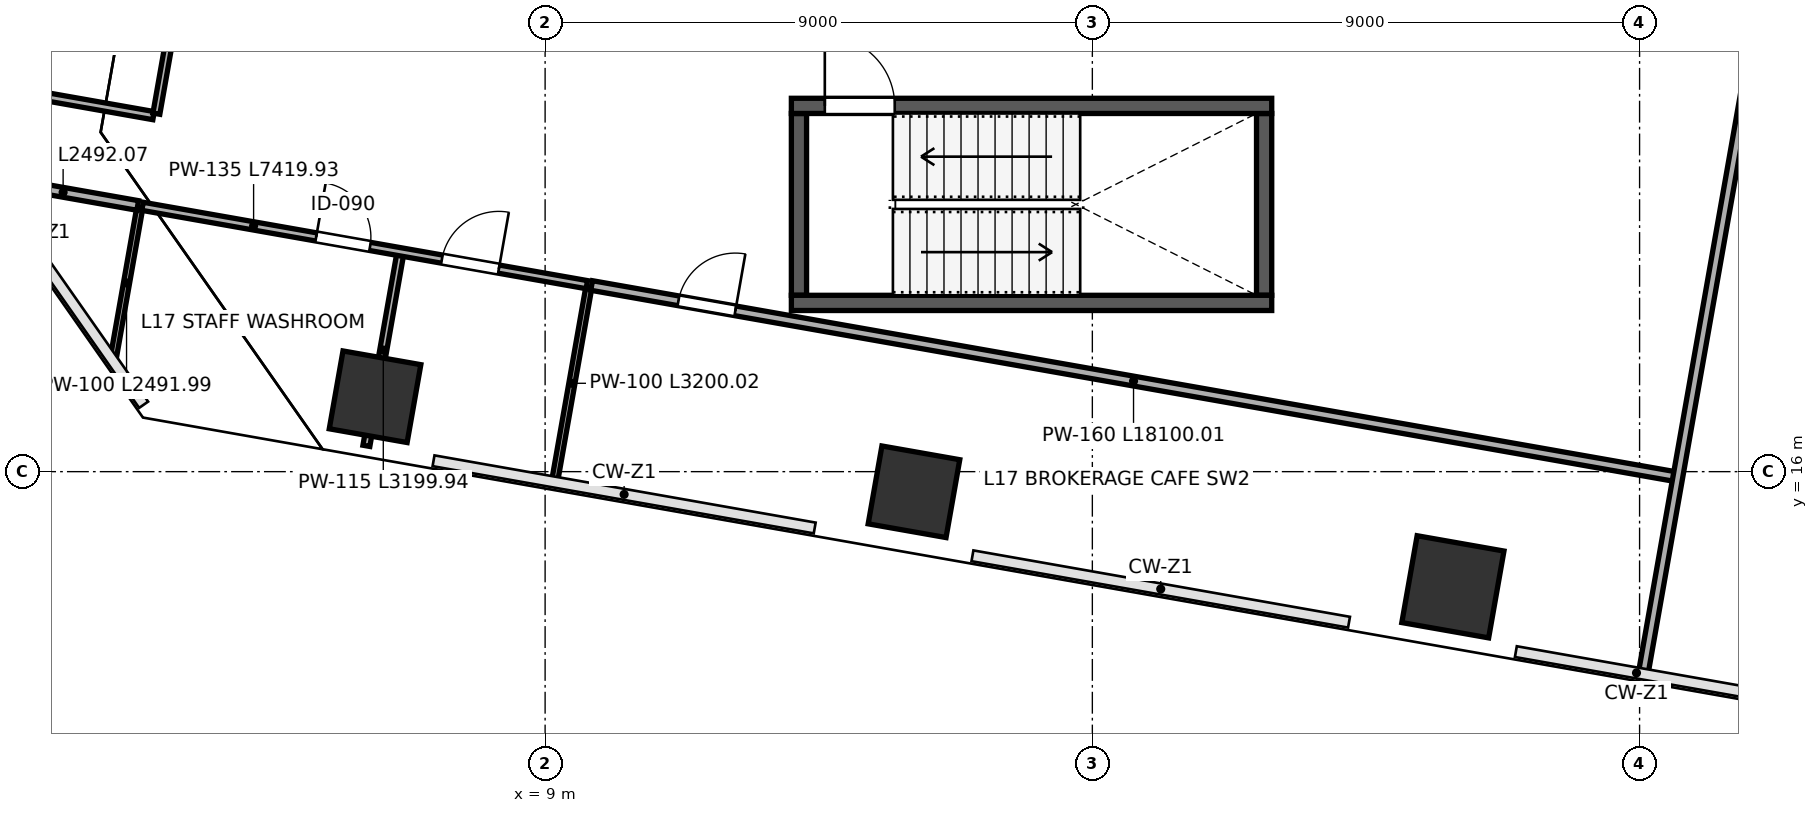
"""IFC4 building model, lengths in metres.
Left out: names, types, materials, properties, quantities, classifications, styles, units other than length and angle.
Written with IfcOpenShell. Run it as: python <this file> out.ifc"""

import sys

from ifc_helpers import new_model, si_unit, direction, frame, frame_2d, origin, origin_2d, place, context, subcontext, project, spatial, rectangle, extrude, clip, halfspace, source, transform, mapped, element, fill, save


model = new_model("IFC4")
c1 = context("Model", 3, precision=1e-05, world=origin(), true_north=direction((0.0, 1.0)))
c2 = subcontext(c1, "Body", "Model", "MODEL_VIEW")
j1 = project(units=[si_unit("LENGTHUNIT", "METRE"), si_unit("PLANEANGLEUNIT", "RADIAN")], contexts=[c1])
p1 = place(None, origin())
s1 = spatial("IfcSite", under=j1, at=p1, CompositionType="ELEMENT")
p2 = place(p1, origin())
s2 = spatial("IfcBuilding", under=s1, at=p2, CompositionType="ELEMENT")
p3 = place(p2, frame((0.0, 0.0, 79.0)))
s3 = spatial("IfcBuildingStorey", under=s2, at=p3, CompositionType="ELEMENT", Elevation=79.0)
p4 = place(p3, frame((6.203, 17.232, 0.0), z_axis=(-0.075400354658, 0.079791486424, 0.993955786347), x_axis=(0.834326240364, 0.550941299546, 0.01906329181)))
e1 = element("IfcColumn", 1, at=p4, inside=s3, PredefinedType="COLUMN", context=c2, shape_type="Clipping", body=[
    clip(clip(extrude(rectangle(XDim=1.3, YDim=1.3, at=origin_2d()), origin(), (0.0, 0.0, 1.0), 4.226), halfspace(frame((0.0, 0.0, 0.084), z_axis=(0.0, 0.0, -1.0), x_axis=(1.0, 0.0, 0.0)), False)), halfspace(frame((0.0, 0.0, 4.142), z_axis=(0.0, 0.0, 1.0), x_axis=(1.0, 0.0, 0.0)), False)),
])
p5 = place(p3, frame((15.066, 15.669, 0.0), z_axis=(-0.084113242022, 0.034154723189, 0.995870683071), x_axis=(0.530733153441, 0.847392356417, 0.015764330737)))
e2 = element("IfcColumn", 2, at=p5, inside=s3, PredefinedType="COLUMN", context=c2, shape_type="Clipping", body=[
    clip(clip(extrude(rectangle(XDim=1.3, YDim=1.3, at=origin_2d()), origin(), (0.0, 0.0, 1.0), 4.217), halfspace(frame((0.0, 0.0, 0.069), z_axis=(0.0, 0.0, -1.0), x_axis=(1.0, 0.0, 0.0)), False)), halfspace(frame((0.0, 0.0, 4.148), z_axis=(0.0, 0.0, 1.0), x_axis=(1.0, 0.0, 0.0)), False)),
])
p6 = place(p3, frame((23.93, 14.106, 0.0), z_axis=(-0.092658591781, -0.011517214094, 0.995631326922), x_axis=(0.050095109852, 0.998612834004, 0.016213812988)))
e3 = element("IfcColumn", 3, at=p6, inside=s3, PredefinedType="COLUMN", context=c2, shape_type="Clipping", body=[
    clip(clip(extrude(rectangle(XDim=1.45, YDim=1.45, at=origin_2d()), origin(), (0.0, 0.0, 1.0), 4.218), halfspace(frame((0.0, 0.0, 0.08), z_axis=(0.0, 0.0, -1.0), x_axis=(1.0, 0.0, 0.0)), False)), halfspace(frame((0.0, 0.0, 4.139), z_axis=(0.0, 0.0, 1.0), x_axis=(1.0, 0.0, 0.0)), False)),
])
for number, where, z_axis, x_axis in (
    (4, (13.175, 18.9, 0.0), (0.0, 0.0, 1.0), (0.0, 1.0, 0.0)),
    (5, (20.825, 18.9, 0.0), (0.0, 0.0, 1.0), (0.0, 1.0, 0.0)),
):
    element("IfcWall", number, at=place(p3, frame(where, z_axis=z_axis, x_axis=x_axis)), inside=s3, PredefinedType="SHEAR", context=c2, shape_type="SweptSolid", body=[
        extrude(rectangle(XDim=2.99, YDim=0.25, at=frame_2d((1.495, 0.0))), origin(), (0.0, 0.0, 1.0), 3.96),
    ])
p7 = place(p3, frame((13.05, 18.775, 0.0), z_axis=(0.0, 0.0, 1.0), x_axis=(1.0, 0.0, 0.0)))
e6 = element("IfcWall", 6, at=p7, inside=s3, PredefinedType="SHEAR", context=c2, shape_type="SweptSolid", body=[
    extrude(rectangle(XDim=7.9, YDim=0.25, at=frame_2d((3.95, 0.0))), origin(), (0.0, 0.0, 1.0), 3.96),
])
p8 = place(p3, frame((13.05, 22.015, 0.0), z_axis=(0.0, 0.0, 1.0), x_axis=(1.0, 0.0, 0.0)))
e7 = element("IfcWall", 7, at=p8, inside=s3, PredefinedType="SHEAR", context=c2, shape_type="SweptSolid", body=[
    extrude(rectangle(XDim=7.9, YDim=0.25, at=frame_2d((3.95, 0.0))), origin(), (0.0, 0.0, 1.0), 3.96),
])
p9 = place(p8, frame((0.55, 0.0, 0.0)))
e8 = element("IfcOpeningElement", 8, at=p9, cuts=e7, PredefinedType="OPENING", context=c2, shape_type="SweptSolid", body=[
    extrude(rectangle(XDim=1.15, YDim=2.2, at=frame_2d((0.575, 1.1))), frame((0.0, 0.135, 0.0), z_axis=(0.0, -1.0, 0.0), x_axis=(1.0, 0.0, 0.0)), (0.0, 0.0, 1.0), 0.27),
])
p10 = place(p3, frame((1.9, 17.877, 0.0), z_axis=(0.0, 0.0, 1.0), x_axis=(0.173701499557, 0.984798349436, 0.0)))
e9 = element("IfcWall", 9, at=p10, inside=s3, PredefinedType="PARTITIONING", context=c2, shape_type="SweptSolid", body=[
    extrude(rectangle(XDim=2.492, YDim=0.1, at=frame_2d((1.246, 0.0))), origin(), (0.0, 0.0, 1.0), 3.96),
])
p11 = place(p3, frame((-0.154, 20.81, 0.0), z_axis=(0.0, 0.0, 1.0), x_axis=(0.984798349436, -0.173701499557, 0.0)))
e10 = element("IfcWall", 10, at=p11, inside=s3, PredefinedType="PARTITIONING", context=c2, shape_type="SweptSolid", body=[
    extrude(rectangle(XDim=2.492, YDim=0.16, at=frame_2d((1.246, 0.0))), origin(), (0.0, 0.0, 1.0), 3.96),
])
p12 = place(p3, frame((6.061, 16.424, 0.0), z_axis=(0.0, 0.0, 1.0), x_axis=(0.173646056486, 0.984808127031, 0.0)))
e11 = element("IfcWall", 11, at=p12, inside=s3, PredefinedType="PARTITIONING", context=c2, shape_type="SweptSolid", body=[
    extrude(rectangle(XDim=3.2, YDim=0.115, at=frame_2d((1.6, 0.0))), origin(), (0.0, 0.0, 1.0), 3.095),
])
p13 = place(p3, frame((9.163, 15.877, 0.0), z_axis=(0.0, 0.0, 1.0), x_axis=(0.173646056486, 0.984808127031, 0.0)))
e12 = element("IfcWall", 12, at=p13, inside=s3, PredefinedType="PARTITIONING", context=c2, shape_type="SweptSolid", body=[
    extrude(rectangle(XDim=3.2, YDim=0.1, at=frame_2d((1.6, 0.0))), origin(), (0.0, 0.0, 1.0), 3.095),
])
p14 = place(p3, frame((2.379, 20.364, 0.0), z_axis=(0.0, 0.0, 1.0), x_axis=(0.984810378022, -0.173633289837, 0.0)))
e13 = element("IfcWall", 13, at=p14, inside=s3, PredefinedType="PARTITIONING", context=c2, shape_type="SweptSolid", body=[
    extrude(rectangle(XDim=7.42, YDim=0.135, at=frame_2d((3.71, 0.0))), origin(), (0.0, 0.0, 1.0), 3.96),
])
p15 = place(p14, frame((2.9, 0.0, 0.0)))
e14 = element("IfcOpeningElement", 14, at=p15, cuts=e13, PredefinedType="OPENING", context=c2, shape_type="SweptSolid", body=[
    extrude(rectangle(XDim=0.9, YDim=2.15, at=frame_2d((0.45, 1.075))), frame((0.0, 0.078, 0.0), z_axis=(0.0, -1.0, 0.0), x_axis=(1.0, 0.0, 0.0)), (0.0, 0.0, 1.0), 0.155),
])
p16 = place(p14, frame((5.0, 0.0, 0.0)))
e15 = element("IfcOpeningElement", 15, at=p16, cuts=e13, PredefinedType="OPENING", context=c2, shape_type="SweptSolid", body=[
    extrude(rectangle(XDim=0.95, YDim=2.15, at=frame_2d((0.475, 1.075))), frame((0.0, 0.078, 0.0), z_axis=(0.0, -1.0, 0.0), x_axis=(1.0, 0.0, 0.0)), (0.0, 0.0, 1.0), 0.155),
])
p17 = place(p3, frame((9.765, 19.061, 0.0), z_axis=(0.0, 0.0, 1.0), x_axis=(0.984807312871, -0.173650673815, 0.0)))
e16 = element("IfcWall", 16, at=p17, inside=s3, PredefinedType="PARTITIONING", context=c2, shape_type="SweptSolid", body=[
    extrude(rectangle(XDim=18.1, YDim=0.16, at=frame_2d((9.05, 0.0))), origin(), (0.0, 0.0, 1.0), 3.96),
])
p18 = place(p17, frame((1.45, 0.0, 0.0)))
e17 = element("IfcOpeningElement", 17, at=p18, cuts=e16, PredefinedType="OPENING", context=c2, shape_type="SweptSolid", body=[
    extrude(rectangle(XDim=0.95, YDim=2.15, at=frame_2d((0.475, 1.075))), frame((0.0, 0.09, 0.0), z_axis=(0.0, -1.0, 0.0), x_axis=(1.0, 0.0, 0.0)), (0.0, 0.0, 1.0), 0.18),
])
p19 = place(p3, frame((-1.014, 22.485, 0.0), z_axis=(0.0, 0.0, 1.0), x_axis=(0.984795743306, -0.173716274326, 0.0)))
e18 = element("IfcWall", 18, at=p19, inside=s3, PredefinedType="PARTITIONING", context=c2, shape_type="SweptSolid", body=[
    extrude(rectangle(XDim=3.63, YDim=0.135, at=frame_2d((1.815, 0.0))), origin(), (0.0, 0.0, 1.0), 3.96),
])
p20 = place(p3, frame((2.607, 21.887, 0.0), z_axis=(0.0, 0.0, 1.0), x_axis=(0.173659666579, 0.984805727138, 0.0)))
e19 = element("IfcWall", 19, at=p20, inside=s3, PredefinedType="PARTITIONING", context=c2, shape_type="SweptSolid", body=[
    extrude(rectangle(XDim=24.05, YDim=0.115, at=frame_2d((12.025, 0.0))), origin(), (0.0, 0.0, 1.0), 2.795),
])
p21 = place(p20, frame((2.2, 0.0, 0.0)))
e20 = element("IfcOpeningElement", 20, at=p21, cuts=e19, PredefinedType="OPENING", context=c2, shape_type="SweptSolid", body=[
    extrude(rectangle(XDim=0.95, YDim=2.15, at=frame_2d((0.475, 1.075))), frame((0.0, 0.067, 0.0), z_axis=(0.0, -1.0, 0.0), x_axis=(1.0, 0.0, 0.0)), (0.0, 0.0, 1.0), 0.135),
])
p22 = place(p3, frame((27.067, 12.72, 0.0), z_axis=(0.0, 0.0, 1.0), x_axis=(0.173654514703, 0.984806635601, 0.0)))
e21 = element("IfcWall", 21, at=p22, inside=s3, PredefinedType="PARTITIONING", context=c2, shape_type="SweptSolid", body=[
    extrude(rectangle(XDim=21.08, YDim=0.16, at=frame_2d((10.54, 0.0))), origin(), (0.0, 0.0, 1.0), 3.96),
])
m1 = source(origin(), c2, "Body", "SweptSolid", [
    extrude(rectangle(XDim=1.15, YDim=2.2, at=frame_2d((0.575, 1.1))), frame((0.0, 0.025, 0.0), z_axis=(0.0, -1.0, 0.0), x_axis=(1.0, 0.0, 0.0)), (0.0, 0.0, 1.0), 0.05),
])
p23 = place(p9, origin())
e22 = element("IfcDoor", 22, at=p23, inside=s3, OperationType="SINGLE_SWING_LEFT", PredefinedType="DOOR", context=c2, shape_type="MappedRepresentation", body=[
    mapped(m1, transform((0.0, 0.0, 0.0), scale=1.0)),
])
fill(e8, e22)
m2 = source(origin(), c2, "Body", "SweptSolid", [
    extrude(rectangle(XDim=0.9, YDim=2.15, at=frame_2d((0.45, 1.075))), frame((0.0, 0.025, 0.0), z_axis=(0.0, -1.0, 0.0), x_axis=(1.0, 0.0, 0.0)), (0.0, 0.0, 1.0), 0.05),
])
p24 = place(p15, origin())
e23 = element("IfcDoor", 23, at=p24, inside=s3, OperationType="SINGLE_SWING_LEFT", PredefinedType="DOOR", context=c2, shape_type="MappedRepresentation", body=[
    mapped(m2, transform((0.0, 0.0, 0.0), scale=1.0)),
])
fill(e14, e23)
m3 = source(origin(), c2, "Body", "SweptSolid", [
    extrude(rectangle(XDim=0.95, YDim=2.15, at=frame_2d((0.475, 1.075))), frame((0.0, 0.025, 0.0), z_axis=(0.0, -1.0, 0.0), x_axis=(1.0, 0.0, 0.0)), (0.0, 0.0, 1.0), 0.05),
])
p25 = place(p16, origin())
e24 = element("IfcDoor", 24, at=p25, inside=s3, OperationType="SINGLE_SWING_RIGHT", PredefinedType="DOOR", context=c2, shape_type="MappedRepresentation", body=[
    mapped(m3, transform((0.0, 0.0, 0.0), scale=1.0)),
])
fill(e15, e24)
m4 = source(origin(), c2, "Body", "SweptSolid", [
    extrude(rectangle(XDim=0.95, YDim=2.15, at=frame_2d((0.475, 1.075))), frame((0.0, 0.025, 0.0), z_axis=(0.0, -1.0, 0.0), x_axis=(1.0, 0.0, 0.0)), (0.0, 0.0, 1.0), 0.05),
])
p26 = place(p18, origin())
e25 = element("IfcDoor", 25, at=p26, inside=s3, OperationType="SINGLE_SWING_RIGHT", PredefinedType="DOOR", context=c2, shape_type="MappedRepresentation", body=[
    mapped(m4, transform((0.0, 0.0, 0.0), scale=1.0)),
])
fill(e17, e25)
save(model, sys.argv[1])
